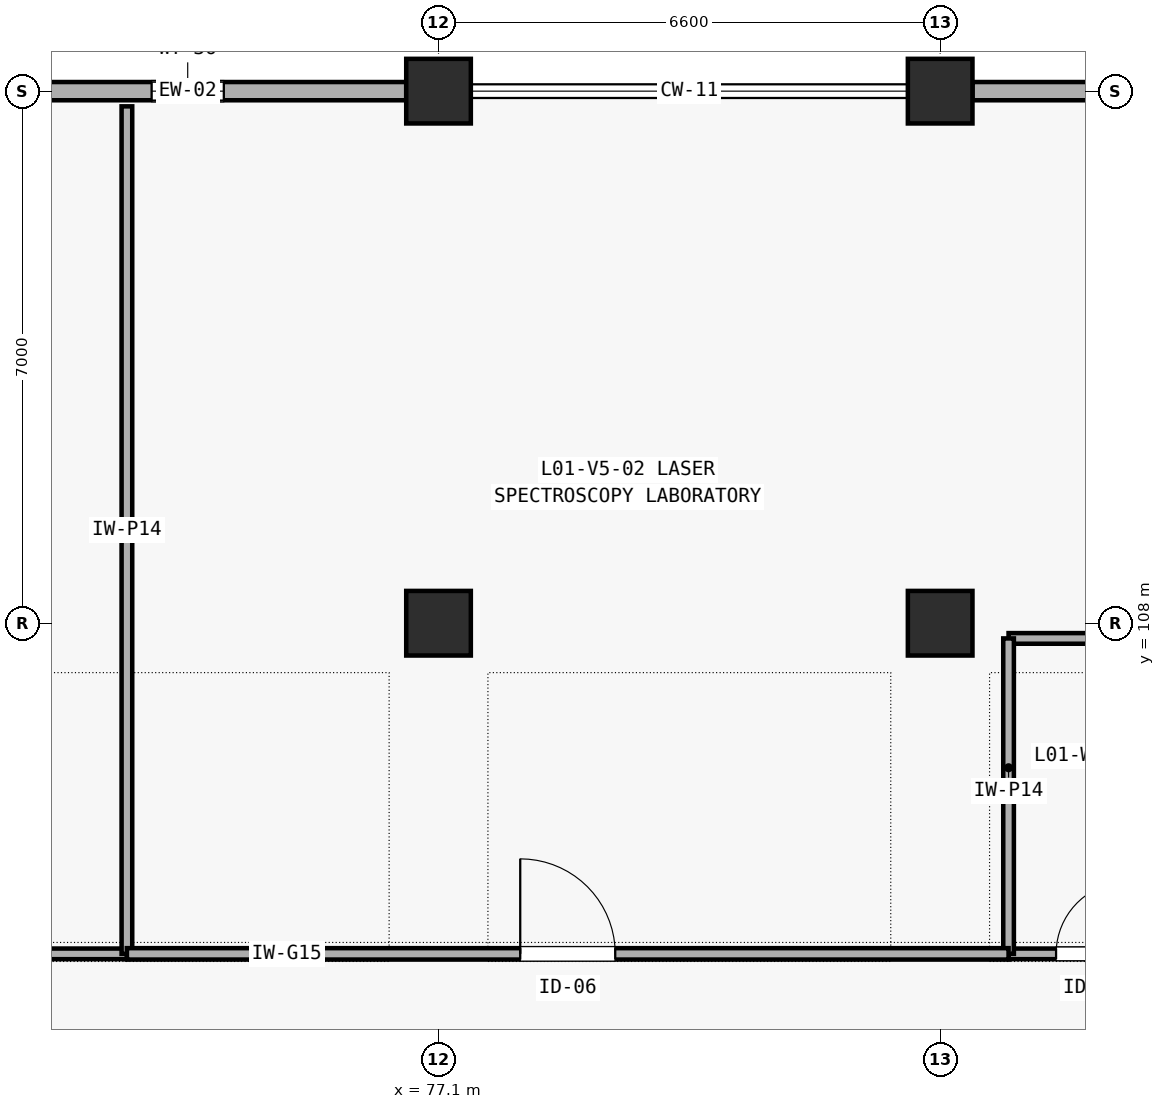
"""IFC4 building model, lengths in metres.
Left out: names, types, materials, properties, quantities, classifications, styles, units other than length and angle.
Written with IfcOpenShell. Run it as: python <this file> out.ifc"""

import sys

from ifc_helpers import new_model, si_unit, direction, frame, frame_2d, origin, origin_2d, place, context, subcontext, project, spatial, rectangle, extrude, element, fill, save


model = new_model("IFC4")
c1 = context("Model", 3, precision=1e-05, world=origin(), true_north=direction((0.0, 1.0)))
c2 = subcontext(c1, "Body", "Model", "MODEL_VIEW")
j1 = project(units=[si_unit("LENGTHUNIT", "METRE"), si_unit("PLANEANGLEUNIT", "RADIAN")], contexts=[c1])
p1 = place(None, origin())
s1 = spatial("IfcSite", under=j1, at=p1, CompositionType="ELEMENT")
p2 = place(p1, origin())
s2 = spatial("IfcBuilding", under=s1, at=p2, CompositionType="ELEMENT")
p3 = place(p2, frame((0.0, 0.0, 4.2)))
s3 = spatial("IfcBuildingStorey", under=s2, at=p3, CompositionType="ELEMENT", Elevation=4.2)
for number, where, z_axis, x_axis in (
    (1, (77.1, 108.0, 0.0), (0.0, 0.0, 1.0), (1.0, 0.0, 0.0)),
    (2, (77.1, 115.0, 0.0), (0.0, 0.0, 1.0), (1.0, 0.0, 0.0)),
    (3, (83.7, 108.0, 0.0), (0.0, 0.0, 1.0), (1.0, 0.0, 0.0)),
    (4, (83.7, 115.0, 0.0), (0.0, 0.0, 1.0), (1.0, 0.0, 0.0)),
):
    element("IfcColumn", number, at=place(p3, frame(where, z_axis=z_axis, x_axis=x_axis)), inside=s3, PredefinedType="COLUMN", context=c2, shape_type="SweptSolid", body=[
        extrude(rectangle(XDim=0.85, YDim=0.85, at=origin_2d()), origin(), (0.0, 0.0, 1.0), 4.2),
    ])
p4 = place(p3, frame((70.925, 115.0, 0.0), z_axis=(0.0, 0.0, 1.0), x_axis=(1.0, 0.0, 0.0)))
e5 = element("IfcWall", 5, at=p4, inside=s3, PredefinedType="SOLIDWALL", context=c2, shape_type="SweptSolid", body=[
    extrude(rectangle(XDim=5.75, YDim=0.24, at=frame_2d((2.875, 0.0))), origin(), (0.0, 0.0, 1.0), 3.135),
])
p5 = place(p4, frame((2.4, 0.0, 0.85)))
e6 = element("IfcOpeningElement", 6, at=p5, cuts=e5, PredefinedType="OPENING", context=c2, shape_type="SweptSolid", body=[
    extrude(rectangle(XDim=0.95, YDim=1.55, at=frame_2d((0.475, 0.775))), frame((0.0, 0.13, 0.0), z_axis=(0.0, -1.0, 0.0), x_axis=(1.0, 0.0, 0.0)), (0.0, 0.0, 1.0), 0.26),
])
p6 = place(p3, frame((84.125, 115.0, 0.0), z_axis=(0.0, 0.0, 1.0), x_axis=(1.0, 0.0, 0.0)))
e7 = element("IfcWall", 7, at=p6, inside=s3, PredefinedType="SOLIDWALL", context=c2, shape_type="SweptSolid", body=[
    extrude(rectangle(XDim=5.75, YDim=0.24, at=frame_2d((2.875, 0.0))), origin(), (0.0, 0.0, 1.0), 3.285),
])
p7 = place(p6, frame((2.0, 0.0, 0.85)))
e8 = element("IfcOpeningElement", 8, at=p7, cuts=e7, PredefinedType="OPENING", context=c2, shape_type="SweptSolid", body=[
    extrude(rectangle(XDim=1.75, YDim=1.55, at=frame_2d((0.875, 0.775))), frame((0.0, 0.13, 0.0), z_axis=(0.0, -1.0, 0.0), x_axis=(1.0, 0.0, 0.0)), (0.0, 0.0, 1.0), 0.26),
])
p8 = place(p3, frame((84.6, 103.65, 0.0), z_axis=(0.0, 0.0, 1.0), x_axis=(1.0, 0.0, 0.0)))
e9 = element("IfcWall", 9, at=p8, inside=s3, PredefinedType="PLUMBINGWALL", context=c2, shape_type="SweptSolid", body=[
    extrude(rectangle(XDim=2.2, YDim=0.14, at=frame_2d((1.1, 0.0))), origin(), (0.0, 0.0, 1.0), 3.9),
])
p9 = place(p8, frame((0.625, 0.0, 0.0)))
e10 = element("IfcOpeningElement", 10, at=p9, cuts=e9, PredefinedType="OPENING", context=c2, shape_type="SweptSolid", body=[
    extrude(rectangle(XDim=0.95, YDim=2.1, at=frame_2d((0.475, 1.05))), frame((0.0, 0.08, 0.0), z_axis=(0.0, -1.0, 0.0), x_axis=(1.0, 0.0, 0.0)), (0.0, 0.0, 1.0), 0.16),
])
p10 = place(p3, frame((84.6, 107.8, 0.0), z_axis=(0.0, 0.0, 1.0), x_axis=(1.0, 0.0, 0.0)))
e11 = element("IfcWall", 11, at=p10, inside=s3, PredefinedType="PLUMBINGWALL", context=c2, shape_type="SweptSolid", body=[
    extrude(rectangle(XDim=2.2, YDim=0.14, at=frame_2d((1.1, 0.0))), origin(), (0.0, 0.0, 1.0), 3.285),
])
p11 = place(p3, frame((84.6, 103.65, 0.0), z_axis=(0.0, 0.0, 1.0), x_axis=(0.0, 1.0, 0.0)))
e12 = element("IfcWall", 12, at=p11, inside=s3, PredefinedType="PLUMBINGWALL", context=c2, shape_type="SweptSolid", body=[
    extrude(rectangle(XDim=4.15, YDim=0.14, at=frame_2d((2.075, 0.0))), origin(), (0.0, 0.0, 1.0), 3.9),
])
p12 = place(p3, frame((57.5, 103.65, 0.0), z_axis=(0.0, 0.0, 1.0), x_axis=(1.0, 0.0, 0.0)))
e13 = element("IfcWall", 13, at=p12, inside=s3, PredefinedType="PLUMBINGWALL", context=c2, shape_type="SweptSolid", body=[
    extrude(rectangle(XDim=15.5, YDim=0.14, at=frame_2d((7.75, 0.0))), origin(), (0.0, 0.0, 1.0), 3.9),
])
p13 = place(p12, frame((7.175, 0.0, 0.0)))
e14 = element("IfcOpeningElement", 14, at=p13, cuts=e13, PredefinedType="OPENING", context=c2, shape_type="SweptSolid", body=[
    extrude(rectangle(XDim=1.15, YDim=2.15, at=frame_2d((0.575, 1.075))), frame((0.0, 0.08, 0.0), z_axis=(0.0, -1.0, 0.0), x_axis=(1.0, 0.0, 0.0)), (0.0, 0.0, 1.0), 0.16),
])
p14 = place(p3, frame((73.0, 103.65, 0.0), z_axis=(0.0, 0.0, 1.0), x_axis=(0.0, 1.0, 0.0)))
e15 = element("IfcWall", 15, at=p14, inside=s3, PredefinedType="PLUMBINGWALL", context=c2, shape_type="SweptSolid", body=[
    extrude(rectangle(XDim=11.15, YDim=0.14, at=frame_2d((5.575, 0.0))), origin(), (0.0, 0.0, 1.0), 3.589),
])
p15 = place(p3, frame((73.0, 103.65, 0.0), z_axis=(0.0, 0.0, 1.0), x_axis=(1.0, 0.0, 0.0)))
e16 = element("IfcWall", 16, at=p15, inside=s3, PredefinedType="PARTITIONING", context=c2, shape_type="SweptSolid", body=[
    extrude(rectangle(XDim=11.6, YDim=0.15, at=frame_2d((5.8, 0.0))), origin(), (0.0, 0.0, 1.0), 3.9),
])
p16 = place(p15, frame((5.175, 0.0, 0.0)))
e17 = element("IfcOpeningElement", 17, at=p16, cuts=e16, PredefinedType="OPENING", context=c2, shape_type="SweptSolid", body=[
    extrude(rectangle(XDim=1.25, YDim=2.15, at=frame_2d((0.625, 1.075))), frame((0.0, 0.085, 0.0), z_axis=(0.0, -1.0, 0.0), x_axis=(1.0, 0.0, 0.0)), (0.0, 0.0, 1.0), 0.17),
])
p17 = place(p5, origin())
e18 = element("IfcWindow", 18, at=p17, inside=s3, PartitioningType="SINGLE_PANEL", PredefinedType="WINDOW", context=c2, shape_type="SweptSolid", body=[
    extrude(rectangle(XDim=0.95, YDim=1.55, at=frame_2d((0.475, 0.775))), frame((0.0, 0.03, 0.0), z_axis=(0.0, -1.0, 0.0), x_axis=(1.0, 0.0, 0.0)), (0.0, 0.0, 1.0), 0.06),
])
fill(e6, e18)
p18 = place(p9, origin())
e19 = element("IfcDoor", 19, at=p18, inside=s3, OperationType="SINGLE_SWING_RIGHT", PredefinedType="DOOR", context=c2, shape_type="SweptSolid", body=[
    extrude(rectangle(XDim=0.95, YDim=2.1, at=frame_2d((0.475, 1.05))), frame((0.0, 0.025, 0.0), z_axis=(0.0, -1.0, 0.0), x_axis=(1.0, 0.0, 0.0)), (0.0, 0.0, 1.0), 0.05),
])
fill(e10, e19)
p19 = place(p16, origin())
e20 = element("IfcDoor", 20, at=p19, inside=s3, OperationType="SINGLE_SWING_LEFT", PredefinedType="DOOR", context=c2, shape_type="SweptSolid", body=[
    extrude(rectangle(XDim=1.25, YDim=2.15, at=frame_2d((0.625, 1.075))), frame((0.0, 0.025, 0.0), z_axis=(0.0, -1.0, 0.0), x_axis=(1.0, 0.0, 0.0)), (0.0, 0.0, 1.0), 0.05),
])
fill(e17, e20)
save(model, sys.argv[1])
